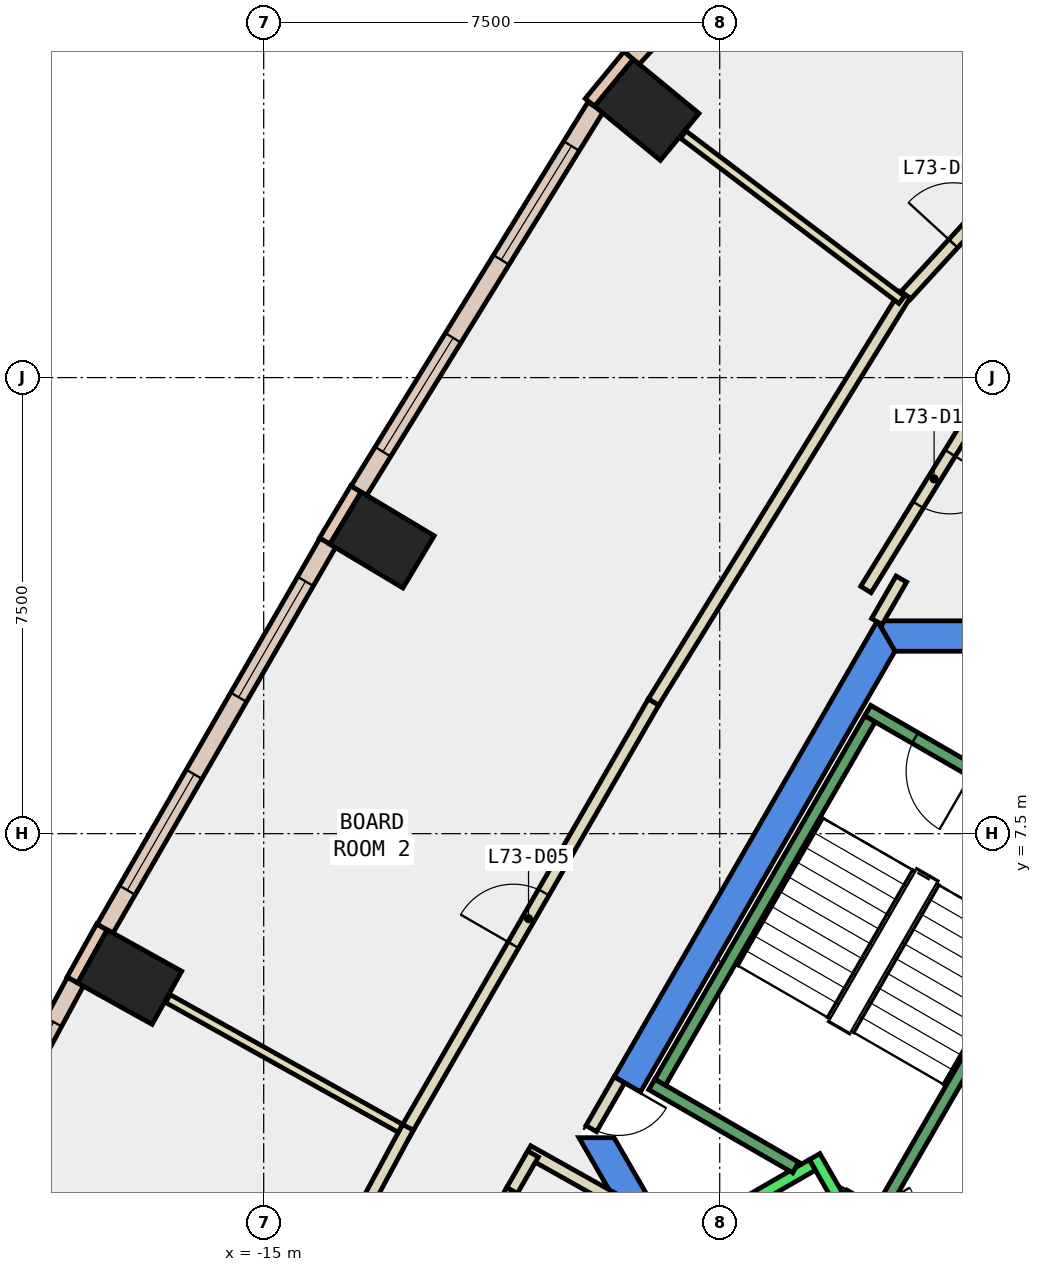
"""IFC4 building model, lengths in metres.
Left out: names, types, materials, properties, quantities, classifications, styles, units other than length and angle.
Written with IfcOpenShell. Run it as: python <this file> out.ifc"""

import sys

from ifc_helpers import new_model, si_unit, direction, frame, frame_2d, origin, origin_2d, place, context, subcontext, project, spatial, polyline, rectangle, outline, extrude, element, fill, save


model = new_model("IFC4")
c1 = context("Model", 3, precision=1e-05, world=origin(), true_north=direction((0.0, 1.0)))
c2 = subcontext(c1, "Body", "Model", "MODEL_VIEW")
j1 = project(units=[si_unit("LENGTHUNIT", "METRE"), si_unit("PLANEANGLEUNIT", "RADIAN")], contexts=[c1])
p1 = place(None, origin())
s1 = spatial("IfcSite", under=j1, at=p1, CompositionType="ELEMENT")
p2 = place(p1, origin())
s2 = spatial("IfcBuilding", under=s1, at=p2, CompositionType="ELEMENT")
p3 = place(p2, frame((0.0, 0.0, 311.6)))
s3 = spatial("IfcBuildingStorey", under=s2, at=p3, CompositionType="ELEMENT", Elevation=311.6)
for number, where, z_axis, x_axis in (
    (1, (-8.699, 19.403, -0.34), (0.0, 0.0, 1.0), (0.636, 0.772, 0.0)),
    (2, (-13.054, 12.329, -0.34), (0.0, 0.0, 1.0), (0.514, 0.858, 0.0)),
    (3, (-17.204, 5.141, -0.34), (0.0, 0.0, 1.0), (0.486, 0.874, 0.0)),
):
    element("IfcColumn", number, at=place(p3, frame(where, z_axis=z_axis, x_axis=x_axis)), inside=s3, PredefinedType="COLUMN", context=c2, shape_type="SweptSolid", body=[
        extrude(rectangle(XDim=1.0, YDim=1.4, at=origin_2d()), origin(), (0.0, 0.0, 1.0), 3.6),
    ])
p4 = place(p3, frame((0.0, 0.0, -0.34)))
e4 = element("IfcWall", 4, at=p4, inside=s3, PredefinedType="SHEAR", context=c2, shape_type="SweptSolid", body=[
    extrude(outline(polyline([(4.907, 11.0), (-4.907, 11.0), (-4.619, 10.5), (4.619, 10.5), (4.907, 11.0)])), origin(), (0.0, 0.0, 1.0), 3.6),
])
p5 = place(p3, frame((0.0, 0.0, -0.34)))
e5 = element("IfcWall", 5, at=p5, inside=s3, PredefinedType="SHEAR", context=c2, shape_type="SweptSolid", body=[
    extrude(outline(polyline([(-9.236, 3.502), (-8.803, 3.253), (-4.619, 10.5), (-4.907, 11.0), (-9.236, 3.502)])), origin(), (0.0, 0.0, 1.0), 3.6),
])
p6 = place(p3, frame((0.0, 0.0, -0.34)))
e6 = element("IfcWall", 6, at=p6, inside=s3, PredefinedType="SHEAR", context=c2, shape_type="SweptSolid", body=[
    extrude(outline(polyline([(-9.815, 2.5), (-4.907, -6.0), (-4.619, -5.5), (-9.238, 2.5), (-9.815, 2.5)])), origin(), (0.0, 0.0, 1.0), 3.6),
])
p7 = place(p3, frame((-8.999, 20.297, 0.0), z_axis=(0.0, 0.0, 1.0), x_axis=(-0.6357329148, -0.77190910154, 0.0)))
e7 = element("IfcWall", 7, at=p7, inside=s3, PredefinedType="STANDARD", context=c2, shape_type="SweptSolid", body=[
    extrude(rectangle(XDim=1.0, YDim=0.2, at=frame_2d((0.5, 0.0))), origin(), (0.0, 0.0, 1.0), 3.26),
])
p8 = place(p3, frame((-13.483, 13.17, 0.0), z_axis=(0.0, 0.0, 1.0), x_axis=(-0.514064933905, -0.857751271482, 0.0)))
e8 = element("IfcWall", 8, at=p8, inside=s3, PredefinedType="STANDARD", context=c2, shape_type="SweptSolid", body=[
    extrude(rectangle(XDim=1.0, YDim=0.2, at=frame_2d((0.5, 0.0))), origin(), (0.0, 0.0, 1.0), 3.26),
])
p9 = place(p3, frame((-17.661, 5.966, 0.0), z_axis=(0.0, 0.0, 1.0), x_axis=(-0.486036693078, -0.873938403425, 0.0)))
e9 = element("IfcWall", 9, at=p9, inside=s3, PredefinedType="STANDARD", context=c2, shape_type="SweptSolid", body=[
    extrude(rectangle(XDim=1.0, YDim=0.2, at=frame_2d((0.5, 0.0))), origin(), (0.0, 0.0, 1.0), 3.26),
])
p10 = place(p3, frame((-5.898, 23.566, 0.0), z_axis=(0.0, 0.0, 1.0), x_axis=(-0.675798306171, -0.737086595575, 0.0)))
e10 = element("IfcWall", 10, at=p10, inside=s3, PredefinedType="STANDARD", context=c2, shape_type="SweptSolid", body=[
    extrude(rectangle(XDim=4.501, YDim=0.3, at=frame_2d((2.25, 0.0))), origin(), (0.0, 0.0, 1.0), 3.26),
])
p11 = place(p10, frame((1.551, 0.0, 0.9)))
e11 = element("IfcOpeningElement", 11, at=p11, cuts=e10, PredefinedType="OPENING", context=c2, shape_type="SweptSolid", body=[
    extrude(rectangle(XDim=1.4, YDim=2.0, at=frame_2d((0.7, 1.0))), frame((0.0, 0.16, 0.0), z_axis=(0.0, -1.0, 0.0), x_axis=(1.0, 0.0, 0.0)), (0.0, 0.0, 1.0), 0.32),
])
p12 = place(p3, frame((-9.542, 19.45, 0.0), z_axis=(0.0, 0.0, 1.0), x_axis=(-0.525070792614, -0.851058554239, 0.0)))
e12 = element("IfcWall", 12, at=p12, inside=s3, PredefinedType="STANDARD", context=c2, shape_type="SweptSolid", body=[
    extrude(rectangle(XDim=7.414, YDim=0.3, at=frame_2d((3.707, 0.0))), origin(), (0.0, 0.0, 1.0), 3.26),
])
p13 = place(p12, frame((0.754, 0.0, 0.9)))
e13 = element("IfcOpeningElement", 13, at=p13, cuts=e12, PredefinedType="OPENING", context=c2, shape_type="SweptSolid", body=[
    extrude(rectangle(XDim=2.2, YDim=2.0, at=frame_2d((1.1, 1.0))), frame((0.0, 0.16, 0.0), z_axis=(0.0, -1.0, 0.0), x_axis=(1.0, 0.0, 0.0)), (0.0, 0.0, 1.0), 0.32),
])
p14 = place(p12, frame((4.461, 0.0, 0.9)))
e14 = element("IfcOpeningElement", 14, at=p14, cuts=e12, PredefinedType="OPENING", context=c2, shape_type="SweptSolid", body=[
    extrude(rectangle(XDim=2.2, YDim=2.0, at=frame_2d((1.1, 1.0))), frame((0.0, 0.16, 0.0), z_axis=(0.0, -1.0, 0.0), x_axis=(1.0, 0.0, 0.0)), (0.0, 0.0, 1.0), 0.32),
])
p15 = place(p3, frame((-13.947, 12.283, 0.0), z_axis=(0.0, 0.0, 1.0), x_axis=(-0.499923391538, -0.866069629183, 0.0)))
e15 = element("IfcWall", 15, at=p15, inside=s3, PredefinedType="STANDARD", context=c2, shape_type="SweptSolid", body=[
    extrude(rectangle(XDim=7.327, YDim=0.3, at=frame_2d((3.664, 0.0))), origin(), (0.0, 0.0, 1.0), 3.26),
])
p16 = place(p15, frame((0.732, 0.0, 0.9)))
e16 = element("IfcOpeningElement", 16, at=p16, cuts=e15, PredefinedType="OPENING", context=c2, shape_type="SweptSolid", body=[
    extrude(rectangle(XDim=2.2, YDim=2.0, at=frame_2d((1.1, 1.0))), frame((0.0, 0.16, 0.0), z_axis=(0.0, -1.0, 0.0), x_axis=(1.0, 0.0, 0.0)), (0.0, 0.0, 1.0), 0.32),
])
p17 = place(p15, frame((4.395, 0.0, 0.9)))
e17 = element("IfcOpeningElement", 17, at=p17, cuts=e15, PredefinedType="OPENING", context=c2, shape_type="SweptSolid", body=[
    extrude(rectangle(XDim=2.2, YDim=2.0, at=frame_2d((1.1, 1.0))), frame((0.0, 0.16, 0.0), z_axis=(0.0, -1.0, 0.0), x_axis=(1.0, 0.0, 0.0)), (0.0, 0.0, 1.0), 0.32),
])
p18 = place(p3, frame((-18.097, 5.066, 0.0), z_axis=(0.0, 0.0, 1.0), x_axis=(-0.474421773145, -0.880297666228, 0.0)))
e18 = element("IfcWall", 18, at=p18, inside=s3, PredefinedType="STANDARD", context=c2, shape_type="SweptSolid", body=[
    extrude(rectangle(XDim=7.416, YDim=0.3, at=frame_2d((3.708, 0.0))), origin(), (0.0, 0.0, 1.0), 3.26),
])
p19 = place(p18, frame((0.754, 0.0, 0.9)))
e19 = element("IfcOpeningElement", 19, at=p19, cuts=e18, PredefinedType="OPENING", context=c2, shape_type="SweptSolid", body=[
    extrude(rectangle(XDim=2.2, YDim=2.0, at=frame_2d((1.1, 1.0))), frame((0.0, 0.16, 0.0), z_axis=(0.0, -1.0, 0.0), x_axis=(1.0, 0.0, 0.0)), (0.0, 0.0, 1.0), 0.32),
])
p20 = place(p18, frame((4.462, 0.0, 0.9)))
e20 = element("IfcOpeningElement", 20, at=p20, cuts=e18, PredefinedType="OPENING", context=c2, shape_type="SweptSolid", body=[
    extrude(rectangle(XDim=2.2, YDim=2.0, at=frame_2d((1.1, 1.0))), frame((0.0, 0.16, 0.0), z_axis=(0.0, -1.0, 0.0), x_axis=(1.0, 0.0, 0.0)), (0.0, 0.0, 1.0), 0.32),
])
p21 = place(p3, frame((-2.852, 15.152, 0.0), z_axis=(0.0, 0.0, 1.0), x_axis=(-0.525050105661, -0.851071316956, 0.0)))
e21 = element("IfcWall", 21, at=p21, inside=s3, PredefinedType="PARTITIONING", context=c2, shape_type="SweptSolid", body=[
    extrude(rectangle(XDim=4.274, YDim=0.2, at=frame_2d((2.137, 0.0))), origin(), (0.0, 0.0, 1.0), 3.26),
])
p22 = place(p21, frame((1.637, 0.0, 0.0)))
e22 = element("IfcOpeningElement", 22, at=p22, cuts=e21, PredefinedType="OPENING", context=c2, shape_type="SweptSolid", body=[
    extrude(rectangle(XDim=1.0, YDim=2.1, at=frame_2d((0.5, 1.05))), frame((0.0, 0.11, 0.0), z_axis=(0.0, -1.0, 0.0), x_axis=(1.0, 0.0, 0.0)), (0.0, 0.0, 1.0), 0.22),
])
p23 = place(p3, frame((-4.513, 11.687, 0.0), z_axis=(0.0, 0.0, 1.0), x_axis=(-0.499556546863, -0.866281280235, 0.0)))
e23 = element("IfcWall", 23, at=p23, inside=s3, PredefinedType="PARTITIONING", context=c2, shape_type="SweptSolid", body=[
    extrude(rectangle(XDim=0.807, YDim=0.2, at=frame_2d((0.403, 0.0))), origin(), (0.0, 0.0, 1.0), 3.26),
])
p24 = place(p3, frame((-9.203, 1.465, 0.0), z_axis=(0.0, 0.0, 1.0), x_axis=(-0.872341127106, 0.488897696823, 0.0)))
e24 = element("IfcWall", 24, at=p24, inside=s3, PredefinedType="PARTITIONING", context=c2, shape_type="SweptSolid", body=[
    extrude(rectangle(XDim=1.667, YDim=0.2, at=frame_2d((0.833, 0.0))), origin(), (0.0, 0.0, 1.0), 3.26),
])
p25 = place(p3, frame((-10.57, 2.232, 0.0), z_axis=(0.0, 0.0, 1.0), x_axis=(-0.500037208726, -0.86600392025, 0.0)))
e25 = element("IfcWall", 25, at=p25, inside=s3, PredefinedType="PARTITIONING", context=c2, shape_type="SweptSolid", body=[
    extrude(rectangle(XDim=0.694, YDim=0.2, at=frame_2d((0.347, 0.0))), origin(), (0.0, 0.0, 1.0), 3.26),
])
p26 = place(p3, frame((-10.917, 1.631, 0.0), z_axis=(0.0, 0.0, 1.0), x_axis=(-0.47449538478, -0.880257990491, 0.0)))
e26 = element("IfcWall", 26, at=p26, inside=s3, PredefinedType="PARTITIONING", context=c2, shape_type="SweptSolid", body=[
    extrude(rectangle(XDim=7.655, YDim=0.2, at=frame_2d((3.827, 0.0))), origin(), (0.0, 0.0, 1.0), 3.26),
])
p27 = place(p26, frame((2.927, 0.0, 0.0)))
e27 = element("IfcOpeningElement", 27, at=p27, cuts=e26, PredefinedType="OPENING", context=c2, shape_type="SweptSolid", body=[
    extrude(rectangle(XDim=1.8, YDim=2.1, at=frame_2d((0.9, 1.05))), frame((0.0, 0.11, 0.0), z_axis=(0.0, -1.0, 0.0), x_axis=(1.0, 0.0, 0.0)), (0.0, 0.0, 1.0), 0.22),
])
p28 = place(p3, frame((-4.439, 16.353, 0.0), z_axis=(0.0, 0.0, 1.0), x_axis=(0.675731313907, 0.737148011871, 0.0)))
e28 = element("IfcWall", 28, at=p28, inside=s3, PredefinedType="PARTITIONING", context=c2, shape_type="SweptSolid", body=[
    extrude(rectangle(XDim=3.307, YDim=0.2, at=frame_2d((1.654, 0.0))), origin(), (0.0, 0.0, 1.0), 3.26),
])
p29 = place(p28, frame((1.154, 0.0, 0.0)))
e29 = element("IfcOpeningElement", 29, at=p29, cuts=e28, PredefinedType="OPENING", context=c2, shape_type="SweptSolid", body=[
    extrude(rectangle(XDim=1.0, YDim=2.1, at=frame_2d((0.5, 1.05))), frame((0.0, 0.11, 0.0), z_axis=(0.0, -1.0, 0.0), x_axis=(1.0, 0.0, 0.0)), (0.0, 0.0, 1.0), 0.22),
])
p30 = place(p3, frame((-12.701, 2.54, 0.0), z_axis=(0.0, 0.0, 1.0), x_axis=(0.499946799636, 0.86605611685, 0.0)))
e30 = element("IfcWall", 30, at=p30, inside=s3, PredefinedType="PARTITIONING", context=c2, shape_type="SweptSolid", body=[
    extrude(rectangle(XDim=8.227, YDim=0.2, at=frame_2d((4.114, 0.0))), origin(), (0.0, 0.0, 1.0), 3.26),
])
p31 = place(p30, frame((3.613, 0.0, 0.0)))
e31 = element("IfcOpeningElement", 31, at=p31, cuts=e30, PredefinedType="OPENING", context=c2, shape_type="SweptSolid", body=[
    extrude(rectangle(XDim=1.0, YDim=2.1, at=frame_2d((0.5, 1.05))), frame((0.0, 0.11, 0.0), z_axis=(0.0, -1.0, 0.0), x_axis=(1.0, 0.0, 0.0)), (0.0, 0.0, 1.0), 0.22),
])
p32 = place(p3, frame((-8.588, 9.665, 0.0), z_axis=(0.0, 0.0, 1.0), x_axis=(0.525142215688, 0.851014484778, 0.0)))
e32 = element("IfcWall", 32, at=p32, inside=s3, PredefinedType="PARTITIONING", context=c2, shape_type="SweptSolid", body=[
    extrude(rectangle(XDim=7.872, YDim=0.2, at=frame_2d((3.936, 0.0))), origin(), (0.0, 0.0, 1.0), 3.26),
])
p33 = place(p3, frame((-16.399, -4.325, 0.0), z_axis=(0.0, 0.0, 1.0), x_axis=(0.474489967676, 0.880260910512, 0.0)))
e33 = element("IfcWall", 33, at=p33, inside=s3, PredefinedType="PARTITIONING", context=c2, shape_type="SweptSolid", body=[
    extrude(rectangle(XDim=7.948, YDim=0.2, at=frame_2d((3.974, 0.0))), origin(), (0.0, 0.0, 1.0), 3.26),
])
p34 = place(p33, frame((3.474, 0.0, 0.0)))
e34 = element("IfcOpeningElement", 34, at=p34, cuts=e33, PredefinedType="OPENING", context=c2, shape_type="SweptSolid", body=[
    extrude(rectangle(XDim=1.0, YDim=2.1, at=frame_2d((0.5, 1.05))), frame((0.0, 0.11, 0.0), z_axis=(0.0, -1.0, 0.0), x_axis=(1.0, 0.0, 0.0)), (0.0, 0.0, 1.0), 0.22),
])
p35 = place(p3, frame((-4.507, 16.279, 0.0), z_axis=(0.0, 0.0, 1.0), x_axis=(-0.797594482062, 0.603194033611, 0.0)))
e35 = element("IfcWall", 35, at=p35, inside=s3, PredefinedType="PARTITIONING", context=c2, shape_type="SweptSolid", body=[
    extrude(rectangle(XDim=4.506, YDim=0.15, at=frame_2d((2.253, 0.0))), origin(), (0.0, 0.0, 1.0), 3.26),
])
p36 = place(p3, frame((-12.751, 2.654, 0.0), z_axis=(0.0, 0.0, 1.0), x_axis=(-0.873277679945, 0.487222837837, 0.0)))
e36 = element("IfcWall", 36, at=p36, inside=s3, PredefinedType="PARTITIONING", context=c2, shape_type="SweptSolid", body=[
    extrude(rectangle(XDim=4.38, YDim=0.15, at=frame_2d((2.19, 0.0))), origin(), (0.0, 0.0, 1.0), 3.26),
])
p37 = place(p3, frame((-9.15, 3.452, 0.0), z_axis=(0.0, 0.0, 1.0), x_axis=(-0.500079945886, -0.865979242085, 0.0)))
e37 = element("IfcWall", 37, at=p37, inside=s3, PredefinedType="PARTITIONING", context=c2, shape_type="SweptSolid", body=[
    extrude(rectangle(XDim=0.926, YDim=0.2, at=frame_2d((0.463, 0.0))), origin(), (0.0, 0.0, 1.0), 2.4),
])
p38 = place(p37, frame((0.017, 0.0, 0.0)))
e38 = element("IfcOpeningElement", 38, at=p38, cuts=e37, PredefinedType="OPENING", context=c2, shape_type="SweptSolid", body=[
    extrude(rectangle(XDim=0.9, YDim=2.1, at=frame_2d((0.45, 1.05))), frame((0.0, 0.11, 0.0), z_axis=(0.0, -1.0, 0.0), x_axis=(1.0, 0.0, 0.0)), (0.0, 0.0, 1.0), 0.22),
])
p39 = place(p3, frame((-5.94, 2.188, 0.0), z_axis=(0.0, 0.0, 1.0), x_axis=(0.500034260056, -0.866005622828, 0.0)))
e39 = element("IfcWall", 39, at=p39, inside=s3, PredefinedType="STANDARD", context=c2, shape_type="SweptSolid", body=[
    extrude(rectangle(XDim=5.399, YDim=0.2, at=frame_2d((2.7, 0.0))), origin(), (0.0, 0.0, 1.0), 3.26),
])
p40 = place(p39, frame((3.075, 0.0, 0.0)))
e40 = element("IfcOpeningElement", 40, at=p40, cuts=e39, PredefinedType="OPENING", context=c2, shape_type="SweptSolid", body=[
    extrude(rectangle(XDim=1.1, YDim=2.1, at=frame_2d((0.55, 1.05))), frame((0.0, 0.11, 0.0), z_axis=(0.0, -1.0, 0.0), x_axis=(1.0, 0.0, 0.0)), (0.0, 0.0, 1.0), 0.22),
])
p41 = place(p39, frame((1.225, 0.0, 0.0)))
e41 = element("IfcOpeningElement", 41, at=p41, cuts=e39, PredefinedType="OPENING", context=c2, shape_type="SweptSolid", body=[
    extrude(rectangle(XDim=1.1, YDim=2.1, at=frame_2d((0.55, 1.05))), frame((0.0, 0.11, 0.0), z_axis=(0.0, -1.0, 0.0), x_axis=(1.0, 0.0, 0.0)), (0.0, 0.0, 1.0), 0.22),
])
p42 = place(p3, frame((-5.977, 2.052, 0.0), z_axis=(0.0, 0.0, 1.0), x_axis=(-0.865973769406, -0.500089422704, 0.0)))
e42 = element("IfcWall", 42, at=p42, inside=s3, PredefinedType="STANDARD", context=c2, shape_type="SweptSolid", body=[
    extrude(rectangle(XDim=2.399, YDim=0.2, at=frame_2d((1.2, 0.0))), origin(), (0.0, 0.0, 1.0), 3.26),
])
p43 = place(p3, frame((-1.256, 7.324, 0.0), z_axis=(0.0, 0.0, 1.0), x_axis=(-0.866046073146, 0.499964197906, 0.0)))
e43 = element("IfcWall", 43, at=p43, inside=s3, PredefinedType="STANDARD", context=c2, shape_type="SweptSolid", body=[
    extrude(rectangle(XDim=4.4, YDim=0.2, at=frame_2d((2.2, 0.0))), origin(), (0.0, 0.0, 1.0), 3.26),
])
p44 = place(p43, frame((2.4, 0.0, 0.0)))
e44 = element("IfcOpeningElement", 44, at=p44, cuts=e43, PredefinedType="OPENING", context=c2, shape_type="SweptSolid", body=[
    extrude(rectangle(XDim=1.1, YDim=2.2, at=frame_2d((0.55, 1.1))), frame((0.0, 0.11, 0.0), z_axis=(0.0, -1.0, 0.0), x_axis=(1.0, 0.0, 0.0)), (0.0, 0.0, 1.0), 0.22),
])
p45 = place(p3, frame((-6.25, 2.01, 0.0), z_axis=(0.0, 0.0, 1.0), x_axis=(-0.86611865017, 0.499838457731, 0.0)))
e45 = element("IfcWall", 45, at=p45, inside=s3, PredefinedType="STANDARD", context=c2, shape_type="SweptSolid", body=[
    extrude(rectangle(XDim=2.733, YDim=0.2, at=frame_2d((1.366, 0.0))), origin(), (0.0, 0.0, 1.0), 3.26),
])
p46 = place(p3, frame((-4.806, 1.176, 0.0), z_axis=(0.0, 0.0, 1.0), x_axis=(-0.866558586415, 0.499075361355, 0.0)))
e46 = element("IfcWall", 46, at=p46, inside=s3, PredefinedType="STANDARD", context=c2, shape_type="SweptSolid", body=[
    extrude(rectangle(XDim=0.751, YDim=0.2, at=frame_2d((0.376, 0.0))), origin(), (0.0, 0.0, 1.0), 3.26),
])
p47 = place(p3, frame((-1.393, 7.288, 0.0), z_axis=(0.0, 0.0, 1.0), x_axis=(-0.499963383562, -0.866046543262, 0.0)))
e47 = element("IfcWall", 47, at=p47, inside=s3, PredefinedType="STANDARD", context=c2, shape_type="SweptSolid", body=[
    extrude(rectangle(XDim=6.9, YDim=0.2, at=frame_2d((3.45, 0.0))), origin(), (0.0, 0.0, 1.0), 3.26),
])
p48 = place(p47, frame((0.45, 0.0, 0.0)))
e48 = element("IfcOpeningElement", 48, at=p48, cuts=e47, PredefinedType="OPENING", context=c2, shape_type="SweptSolid", body=[
    extrude(rectangle(XDim=1.1, YDim=2.2, at=frame_2d((0.55, 1.1))), frame((0.0, 0.11, 0.0), z_axis=(0.0, -1.0, 0.0), x_axis=(1.0, 0.0, 0.0)), (0.0, 0.0, 1.0), 0.22),
])
p49 = place(p3, frame((-5.03, 9.388, 0.0), z_axis=(0.0, 0.0, 1.0), x_axis=(-0.499978703459, -0.866037698999, 0.0)))
e49 = element("IfcWall", 49, at=p49, inside=s3, PredefinedType="STANDARD", context=c2, shape_type="SweptSolid", body=[
    extrude(rectangle(XDim=6.9, YDim=0.2, at=frame_2d((3.45, 0.0))), origin(), (0.0, 0.0, 1.0), 3.26),
])
p50 = place(p13, origin())
e50 = element("IfcWindow", 50, at=p50, inside=s3, PartitioningType="SINGLE_PANEL", PredefinedType="WINDOW", context=c2, shape_type="SweptSolid", body=[
    extrude(rectangle(XDim=2.2, YDim=2.0, at=frame_2d((1.1, 1.0))), frame((0.0, 0.03, 0.0), z_axis=(0.0, -1.0, 0.0), x_axis=(1.0, 0.0, 0.0)), (0.0, 0.0, 1.0), 0.06),
])
fill(e13, e50)
p51 = place(p14, origin())
e51 = element("IfcWindow", 51, at=p51, inside=s3, PartitioningType="SINGLE_PANEL", PredefinedType="WINDOW", context=c2, shape_type="SweptSolid", body=[
    extrude(rectangle(XDim=2.2, YDim=2.0, at=frame_2d((1.1, 1.0))), frame((0.0, 0.03, 0.0), z_axis=(0.0, -1.0, 0.0), x_axis=(1.0, 0.0, 0.0)), (0.0, 0.0, 1.0), 0.06),
])
fill(e14, e51)
p52 = place(p16, origin())
e52 = element("IfcWindow", 52, at=p52, inside=s3, PartitioningType="SINGLE_PANEL", PredefinedType="WINDOW", context=c2, shape_type="SweptSolid", body=[
    extrude(rectangle(XDim=2.2, YDim=2.0, at=frame_2d((1.1, 1.0))), frame((0.0, 0.03, 0.0), z_axis=(0.0, -1.0, 0.0), x_axis=(1.0, 0.0, 0.0)), (0.0, 0.0, 1.0), 0.06),
])
fill(e16, e52)
p53 = place(p17, origin())
e53 = element("IfcWindow", 53, at=p53, inside=s3, PartitioningType="SINGLE_PANEL", PredefinedType="WINDOW", context=c2, shape_type="SweptSolid", body=[
    extrude(rectangle(XDim=2.2, YDim=2.0, at=frame_2d((1.1, 1.0))), frame((0.0, 0.03, 0.0), z_axis=(0.0, -1.0, 0.0), x_axis=(1.0, 0.0, 0.0)), (0.0, 0.0, 1.0), 0.06),
])
fill(e17, e53)
p54 = place(p19, origin())
e54 = element("IfcWindow", 54, at=p54, inside=s3, PartitioningType="SINGLE_PANEL", PredefinedType="WINDOW", context=c2, shape_type="SweptSolid", body=[
    extrude(rectangle(XDim=2.2, YDim=2.0, at=frame_2d((1.1, 1.0))), frame((0.0, 0.03, 0.0), z_axis=(0.0, -1.0, 0.0), x_axis=(1.0, 0.0, 0.0)), (0.0, 0.0, 1.0), 0.06),
])
fill(e19, e54)
p55 = place(p29, origin())
e55 = element("IfcDoor", 55, at=p55, inside=s3, OperationType="SINGLE_SWING_LEFT", PredefinedType="DOOR", context=c2, shape_type="SweptSolid", body=[
    extrude(rectangle(XDim=1.0, YDim=2.1, at=frame_2d((0.5, 1.05))), frame((0.0, 0.025, 0.0), z_axis=(0.0, -1.0, 0.0), x_axis=(1.0, 0.0, 0.0)), (0.0, 0.0, 1.0), 0.05),
])
fill(e29, e55)
p56 = place(p31, origin())
e56 = element("IfcDoor", 56, at=p56, inside=s3, OperationType="SINGLE_SWING_RIGHT", PredefinedType="DOOR", context=c2, shape_type="SweptSolid", body=[
    extrude(rectangle(XDim=1.0, YDim=2.1, at=frame_2d((0.5, 1.05))), frame((0.0, 0.025, 0.0), z_axis=(0.0, -1.0, 0.0), x_axis=(1.0, 0.0, 0.0)), (0.0, 0.0, 1.0), 0.05),
])
fill(e31, e56)
p57 = place(p22, origin())
e57 = element("IfcDoor", 57, at=p57, inside=s3, OperationType="SINGLE_SWING_LEFT", PredefinedType="DOOR", context=c2, shape_type="SweptSolid", body=[
    extrude(rectangle(XDim=1.0, YDim=2.1, at=frame_2d((0.5, 1.05))), frame((0.0, 0.025, 0.0), z_axis=(0.0, -1.0, 0.0), x_axis=(1.0, 0.0, 0.0)), (0.0, 0.0, 1.0), 0.05),
])
fill(e22, e57)
p58 = place(p38, origin())
e58 = element("IfcDoor", 58, at=p58, inside=s3, OperationType="SINGLE_SWING_LEFT", PredefinedType="DOOR", context=c2, shape_type="SweptSolid", body=[
    extrude(rectangle(XDim=0.9, YDim=2.1, at=frame_2d((0.45, 1.05))), frame((0.0, 0.025, 0.0), z_axis=(0.0, -1.0, 0.0), x_axis=(1.0, 0.0, 0.0)), (0.0, 0.0, 1.0), 0.05),
])
fill(e38, e58)
p59 = place(p44, origin())
e59 = element("IfcDoor", 59, at=p59, inside=s3, OperationType="SINGLE_SWING_LEFT", PredefinedType="DOOR", context=c2, shape_type="SweptSolid", body=[
    extrude(rectangle(XDim=1.1, YDim=2.2, at=frame_2d((0.55, 1.1))), frame((0.0, 0.025, 0.0), z_axis=(0.0, -1.0, 0.0), x_axis=(1.0, 0.0, 0.0)), (0.0, 0.0, 1.0), 0.05),
])
fill(e44, e59)
save(model, sys.argv[1])
